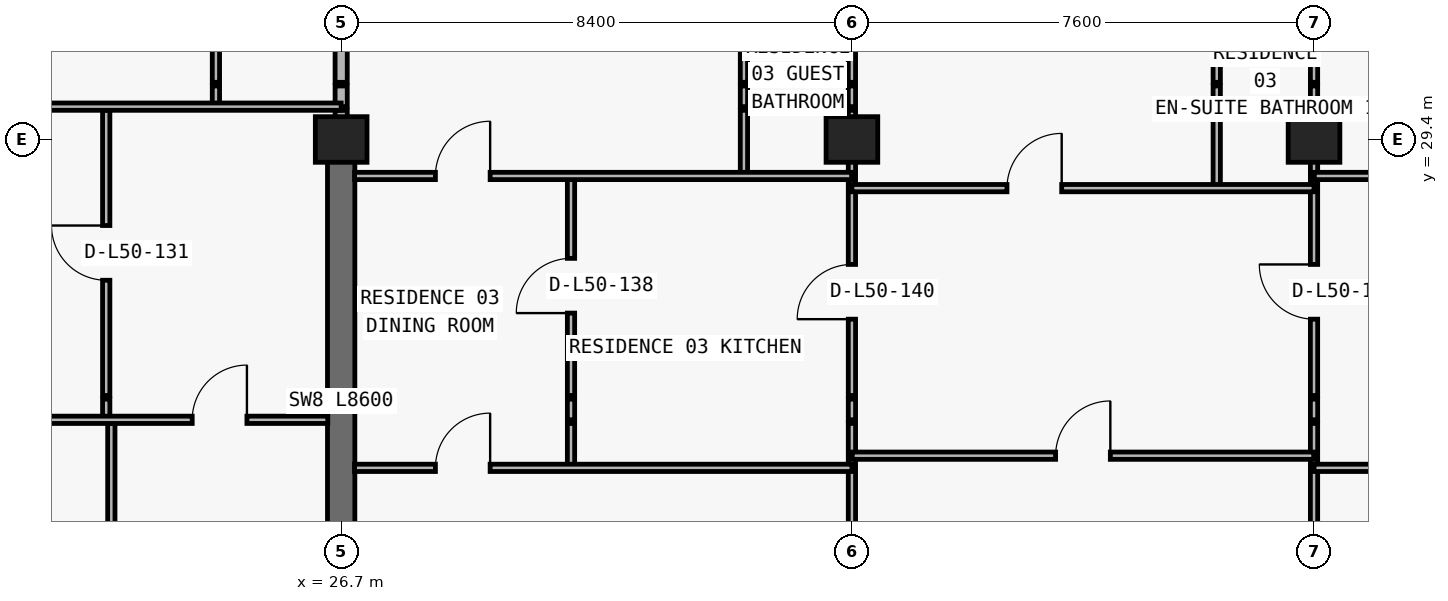
"""IFC4 building model, lengths in metres.
Left out: names, types, materials, properties, quantities, classifications, styles, units other than length and angle.
Written with IfcOpenShell. Run it as: python <this file> out.ifc"""

import sys

from ifc_helpers import new_model, si_unit, direction, frame, frame_2d, origin, origin_2d, place, context, subcontext, project, spatial, rectangle, extrude, element, fill, save


model = new_model("IFC4")
c1 = context("Model", 3, precision=1e-05, world=origin(), true_north=direction((0.0, 1.0)))
c2 = subcontext(c1, "Body", "Model", "MODEL_VIEW")
j1 = project(units=[si_unit("LENGTHUNIT", "METRE"), si_unit("PLANEANGLEUNIT", "RADIAN")], contexts=[c1])
p1 = place(None, origin())
s1 = spatial("IfcSite", under=j1, at=p1, CompositionType="ELEMENT")
p2 = place(p1, origin())
s2 = spatial("IfcBuilding", under=s1, at=p2, CompositionType="ELEMENT")
p3 = place(p2, frame((0.0, 0.0, 180.3)))
s3 = spatial("IfcBuildingStorey", under=s2, at=p3, CompositionType="ELEMENT", Elevation=180.3)
for number, where, z_axis, x_axis in (
    (1, (26.7, 29.4, 0.0), (0.0, 0.0, 1.0), (1.0, 0.0, 0.0)),
    (2, (35.1, 29.4, 0.0), (0.0, 0.0, 1.0), (1.0, 0.0, 0.0)),
    (3, (42.7, 29.4, 0.0), (0.0, 0.0, 1.0), (1.0, 0.0, 0.0)),
):
    element("IfcColumn", number, at=place(p3, frame(where, z_axis=z_axis, x_axis=x_axis)), inside=s3, PredefinedType="COLUMN", context=c2, shape_type="SweptSolid", body=[
        extrude(rectangle(XDim=0.85, YDim=0.75, at=origin_2d()), origin(), (0.0, 0.0, 1.0), 3.0),
    ])
p4 = place(p3, frame((26.7, 20.8, 0.0), z_axis=(0.0, 0.0, 1.0), x_axis=(0.0, 1.0, 0.0)))
e4 = element("IfcWall", 4, at=p4, inside=s3, PredefinedType="SHEAR", context=c2, shape_type="SweptSolid", body=[
    extrude(rectangle(XDim=8.6, YDim=0.45, at=frame_2d((4.3, 0.0))), origin(), (0.0, 0.0, 1.0), 3.0),
])
p5 = place(p3, frame((22.836, 24.79, 0.0), z_axis=(0.0, 0.0, 1.0), x_axis=(0.0, 1.0, 0.0)))
e5 = element("IfcWall", 5, at=p5, inside=s3, PredefinedType="PARTITIONING", context=c2, shape_type="SweptSolid", body=[
    extrude(rectangle(XDim=0.34, YDim=0.12, at=frame_2d((0.17, 0.0))), origin(), (0.0, 0.0, 1.0), 3.0),
])
p6 = place(p3, frame((22.836, 25.19, 0.0), z_axis=(0.0, 0.0, 1.0), x_axis=(0.0, 1.0, 0.0)))
e6 = element("IfcWall", 6, at=p6, inside=s3, PredefinedType="PARTITIONING", context=c2, shape_type="SweptSolid", body=[
    extrude(rectangle(XDim=4.69, YDim=0.12, at=frame_2d((2.345, 0.0))), origin(), (0.0, 0.0, 1.0), 3.0),
])
p7 = place(p6, frame((1.895, 0.0, 0.0)))
e7 = element("IfcOpeningElement", 7, at=p7, cuts=e6, PredefinedType="OPENING", context=c2, shape_type="SweptSolid", body=[
    extrude(rectangle(XDim=0.9, YDim=2.15, at=frame_2d((0.45, 1.075))), frame((0.0, 0.07, 0.0), z_axis=(0.0, -1.0, 0.0), x_axis=(1.0, 0.0, 0.0)), (0.0, 0.0, 1.0), 0.14),
])
p8 = place(p3, frame((22.92, 11.24, 0.0), z_axis=(0.0, 0.0, 1.0), x_axis=(0.0, 1.0, 0.0)))
e8 = element("IfcWall", 8, at=p8, inside=s3, PredefinedType="PARTITIONING", context=c2, shape_type="SweptSolid", body=[
    extrude(rectangle(XDim=13.49, YDim=0.12, at=frame_2d((6.745, 0.0))), origin(), (0.0, 0.0, 1.0), 3.0),
])
p9 = place(p3, frame((24.64, 29.94, 0.0), z_axis=(0.0, 0.0, 1.0), x_axis=(0.0, 1.0, 0.0)))
e9 = element("IfcWall", 9, at=p9, inside=s3, PredefinedType="PARTITIONING", context=c2, shape_type="SweptSolid", body=[
    extrude(rectangle(XDim=0.34, YDim=0.12, at=frame_2d((0.17, 0.0))), origin(), (0.0, 0.0, 1.0), 3.0),
])
p10 = place(p3, frame((24.64, 30.34, 0.0), z_axis=(0.0, 0.0, 1.0), x_axis=(0.0, 1.0, 0.0)))
e10 = element("IfcWall", 10, at=p10, inside=s3, PredefinedType="PARTITIONING", context=c2, shape_type="SweptSolid", body=[
    extrude(rectangle(XDim=4.26, YDim=0.12, at=frame_2d((2.13, 0.0))), origin(), (0.0, 0.0, 1.0), 3.0),
])
p11 = place(p10, frame((1.705, 0.0, 0.0)))
e11 = element("IfcOpeningElement", 11, at=p11, cuts=e10, PredefinedType="OPENING", context=c2, shape_type="SweptSolid", body=[
    extrude(rectangle(XDim=0.85, YDim=2.1, at=frame_2d((0.425, 1.05))), frame((0.0, 0.07, 0.0), z_axis=(0.0, -1.0, 0.0), x_axis=(1.0, 0.0, 0.0)), (0.0, 0.0, 1.0), 0.14),
])
p12 = place(p3, frame((26.7, 29.405, 0.0), z_axis=(0.0, 0.0, 1.0), x_axis=(0.0, 1.0, 0.0)))
e12 = element("IfcWall", 12, at=p12, inside=s3, PredefinedType="PARTITIONING", context=c2, shape_type="SweptSolid", body=[
    extrude(rectangle(XDim=0.475, YDim=0.2, at=frame_2d((0.237, 0.0))), origin(), (0.0, 0.0, 1.0), 2.285),
])
p13 = place(p3, frame((26.7, 29.94, 0.0), z_axis=(0.0, 0.0, 1.0), x_axis=(0.0, 1.0, 0.0)))
e13 = element("IfcWall", 13, at=p13, inside=s3, PredefinedType="PARTITIONING", context=c2, shape_type="SweptSolid", body=[
    extrude(rectangle(XDim=0.34, YDim=0.2, at=frame_2d((0.17, 0.0))), origin(), (0.0, 0.0, 1.0), 2.285),
])
p14 = place(p3, frame((26.7, 30.34, 0.0), z_axis=(0.0, 0.0, 1.0), x_axis=(0.0, 1.0, 0.0)))
e14 = element("IfcWall", 14, at=p14, inside=s3, PredefinedType="PARTITIONING", context=c2, shape_type="SweptSolid", body=[
    extrude(rectangle(XDim=4.26, YDim=0.2, at=frame_2d((2.13, 0.0))), origin(), (0.0, 0.0, 1.0), 2.285),
])
p15 = place(p3, frame((30.48, 24.0, 0.0), z_axis=(0.0, 0.0, 1.0), x_axis=(0.0, 1.0, 0.0)))
e15 = element("IfcWall", 15, at=p15, inside=s3, PredefinedType="PARTITIONING", context=c2, shape_type="SweptSolid", body=[
    extrude(rectangle(XDim=0.73, YDim=0.12, at=frame_2d((0.365, 0.0))), origin(), (0.0, 0.0, 1.0), 3.0),
])
p16 = place(p3, frame((30.48, 24.79, 0.0), z_axis=(0.0, 0.0, 1.0), x_axis=(0.0, 1.0, 0.0)))
e16 = element("IfcWall", 16, at=p16, inside=s3, PredefinedType="PARTITIONING", context=c2, shape_type="SweptSolid", body=[
    extrude(rectangle(XDim=0.34, YDim=0.12, at=frame_2d((0.17, 0.0))), origin(), (0.0, 0.0, 1.0), 3.0),
])
p17 = place(p3, frame((30.48, 25.19, 0.0), z_axis=(0.0, 0.0, 1.0), x_axis=(0.0, 1.0, 0.0)))
e17 = element("IfcWall", 17, at=p17, inside=s3, PredefinedType="PARTITIONING", context=c2, shape_type="SweptSolid", body=[
    extrude(rectangle(XDim=3.61, YDim=0.12, at=frame_2d((1.805, 0.0))), origin(), (0.0, 0.0, 1.0), 3.0),
])
p18 = place(p17, frame((1.355, 0.0, 0.0)))
e18 = element("IfcOpeningElement", 18, at=p18, cuts=e17, PredefinedType="OPENING", context=c2, shape_type="SweptSolid", body=[
    extrude(rectangle(XDim=0.9, YDim=2.15, at=frame_2d((0.45, 1.075))), frame((0.0, 0.07, 0.0), z_axis=(0.0, -1.0, 0.0), x_axis=(1.0, 0.0, 0.0)), (0.0, 0.0, 1.0), 0.14),
])
p19 = place(p3, frame((33.324, 28.8, 0.0), z_axis=(0.0, 0.0, 1.0), x_axis=(0.0, 1.0, 0.0)))
e19 = element("IfcWall", 19, at=p19, inside=s3, PredefinedType="PARTITIONING", context=c2, shape_type="SweptSolid", body=[
    extrude(rectangle(XDim=1.08, YDim=0.12, at=frame_2d((0.54, 0.0))), origin(), (0.0, 0.0, 1.0), 3.0),
])
p20 = place(p3, frame((33.324, 29.94, 0.0), z_axis=(0.0, 0.0, 1.0), x_axis=(0.0, 1.0, 0.0)))
e20 = element("IfcWall", 20, at=p20, inside=s3, PredefinedType="PARTITIONING", context=c2, shape_type="SweptSolid", body=[
    extrude(rectangle(XDim=0.34, YDim=0.12, at=frame_2d((0.17, 0.0))), origin(), (0.0, 0.0, 1.0), 3.0),
])
p21 = place(p3, frame((33.324, 30.34, 0.0), z_axis=(0.0, 0.0, 1.0), x_axis=(0.0, 1.0, 0.0)))
e21 = element("IfcWall", 21, at=p21, inside=s3, PredefinedType="PARTITIONING", context=c2, shape_type="SweptSolid", body=[
    extrude(rectangle(XDim=4.26, YDim=0.12, at=frame_2d((2.13, 0.0))), origin(), (0.0, 0.0, 1.0), 3.0),
])
p22 = place(p21, frame((1.705, 0.0, 0.0)))
e22 = element("IfcOpeningElement", 22, at=p22, cuts=e21, PredefinedType="OPENING", context=c2, shape_type="SweptSolid", body=[
    extrude(rectangle(XDim=0.85, YDim=2.1, at=frame_2d((0.425, 1.05))), frame((0.0, 0.07, 0.0), z_axis=(0.0, -1.0, 0.0), x_axis=(1.0, 0.0, 0.0)), (0.0, 0.0, 1.0), 0.14),
])
p23 = place(p3, frame((35.1, 11.24, 0.0), z_axis=(0.0, 0.0, 1.0), x_axis=(0.0, 1.0, 0.0)))
e23 = element("IfcWall", 23, at=p23, inside=s3, PredefinedType="PARTITIONING", context=c2, shape_type="SweptSolid", body=[
    extrude(rectangle(XDim=13.49, YDim=0.12, at=frame_2d((6.745, 0.0))), origin(), (0.0, 0.0, 1.0), 2.213),
])
p24 = place(p3, frame((35.1, 24.79, 0.0), z_axis=(0.0, 0.0, 1.0), x_axis=(0.0, 1.0, 0.0)))
e24 = element("IfcWall", 24, at=p24, inside=s3, PredefinedType="PARTITIONING", context=c2, shape_type="SweptSolid", body=[
    extrude(rectangle(XDim=0.34, YDim=0.12, at=frame_2d((0.17, 0.0))), origin(), (0.0, 0.0, 1.0), 2.213),
])
p25 = place(p3, frame((35.1, 25.19, 0.0), z_axis=(0.0, 0.0, 1.0), x_axis=(0.0, 1.0, 0.0)))
e25 = element("IfcWall", 25, at=p25, inside=s3, PredefinedType="PARTITIONING", context=c2, shape_type="SweptSolid", body=[
    extrude(rectangle(XDim=4.69, YDim=0.12, at=frame_2d((2.345, 0.0))), origin(), (0.0, 0.0, 1.0), 2.213),
])
p26 = place(p25, frame((1.255, 0.0, 0.0)))
e26 = element("IfcOpeningElement", 26, at=p26, cuts=e25, PredefinedType="OPENING", context=c2, shape_type="SweptSolid", body=[
    extrude(rectangle(XDim=0.9, YDim=2.15, at=frame_2d((0.45, 1.075))), frame((0.0, 0.07, 0.0), z_axis=(0.0, -1.0, 0.0), x_axis=(1.0, 0.0, 0.0)), (0.0, 0.0, 1.0), 0.14),
])
p27 = place(p3, frame((35.1, 29.94, 0.0), z_axis=(0.0, 0.0, 1.0), x_axis=(0.0, 1.0, 0.0)))
e27 = element("IfcWall", 27, at=p27, inside=s3, PredefinedType="PARTITIONING", context=c2, shape_type="SweptSolid", body=[
    extrude(rectangle(XDim=0.34, YDim=0.12, at=frame_2d((0.17, 0.0))), origin(), (0.0, 0.0, 1.0), 2.213),
])
p28 = place(p3, frame((35.1, 30.34, 0.0), z_axis=(0.0, 0.0, 1.0), x_axis=(0.0, 1.0, 0.0)))
e28 = element("IfcWall", 28, at=p28, inside=s3, PredefinedType="PARTITIONING", context=c2, shape_type="SweptSolid", body=[
    extrude(rectangle(XDim=4.26, YDim=0.12, at=frame_2d((2.13, 0.0))), origin(), (0.0, 0.0, 1.0), 2.213),
])
p29 = place(p3, frame((41.1, 28.6, 0.0), z_axis=(0.0, 0.0, 1.0), x_axis=(0.0, 1.0, 0.0)))
e29 = element("IfcWall", 29, at=p29, inside=s3, PredefinedType="PARTITIONING", context=c2, shape_type="SweptSolid", body=[
    extrude(rectangle(XDim=1.28, YDim=0.12, at=frame_2d((0.64, 0.0))), origin(), (0.0, 0.0, 1.0), 3.0),
])
p30 = place(p3, frame((41.1, 29.94, 0.0), z_axis=(0.0, 0.0, 1.0), x_axis=(0.0, 1.0, 0.0)))
e30 = element("IfcWall", 30, at=p30, inside=s3, PredefinedType="PARTITIONING", context=c2, shape_type="SweptSolid", body=[
    extrude(rectangle(XDim=0.34, YDim=0.12, at=frame_2d((0.17, 0.0))), origin(), (0.0, 0.0, 1.0), 3.0),
])
p31 = place(p3, frame((41.1, 30.34, 0.0), z_axis=(0.0, 0.0, 1.0), x_axis=(0.0, 1.0, 0.0)))
e31 = element("IfcWall", 31, at=p31, inside=s3, PredefinedType="PARTITIONING", context=c2, shape_type="SweptSolid", body=[
    extrude(rectangle(XDim=4.26, YDim=0.12, at=frame_2d((2.13, 0.0))), origin(), (0.0, 0.0, 1.0), 3.0),
])
p32 = place(p31, frame((1.705, 0.0, 0.0)))
e32 = element("IfcOpeningElement", 32, at=p32, cuts=e31, PredefinedType="OPENING", context=c2, shape_type="SweptSolid", body=[
    extrude(rectangle(XDim=0.85, YDim=2.1, at=frame_2d((0.425, 1.05))), frame((0.0, 0.07, 0.0), z_axis=(0.0, -1.0, 0.0), x_axis=(1.0, 0.0, 0.0)), (0.0, 0.0, 1.0), 0.14),
])
p33 = place(p3, frame((42.7, 11.24, 0.0), z_axis=(0.0, 0.0, 1.0), x_axis=(0.0, 1.0, 0.0)))
e33 = element("IfcWall", 33, at=p33, inside=s3, PredefinedType="PARTITIONING", context=c2, shape_type="SweptSolid", body=[
    extrude(rectangle(XDim=13.49, YDim=0.12, at=frame_2d((6.745, 0.0))), origin(), (0.0, 0.0, 1.0), 2.213),
])
p34 = place(p3, frame((42.7, 24.79, 0.0), z_axis=(0.0, 0.0, 1.0), x_axis=(0.0, 1.0, 0.0)))
e34 = element("IfcWall", 34, at=p34, inside=s3, PredefinedType="PARTITIONING", context=c2, shape_type="SweptSolid", body=[
    extrude(rectangle(XDim=0.34, YDim=0.12, at=frame_2d((0.17, 0.0))), origin(), (0.0, 0.0, 1.0), 2.213),
])
p35 = place(p3, frame((42.7, 25.19, 0.0), z_axis=(0.0, 0.0, 1.0), x_axis=(0.0, 1.0, 0.0)))
e35 = element("IfcWall", 35, at=p35, inside=s3, PredefinedType="PARTITIONING", context=c2, shape_type="SweptSolid", body=[
    extrude(rectangle(XDim=4.69, YDim=0.12, at=frame_2d((2.345, 0.0))), origin(), (0.0, 0.0, 1.0), 2.213),
])
p36 = place(p35, frame((1.255, 0.0, 0.0)))
e36 = element("IfcOpeningElement", 36, at=p36, cuts=e35, PredefinedType="OPENING", context=c2, shape_type="SweptSolid", body=[
    extrude(rectangle(XDim=0.9, YDim=2.15, at=frame_2d((0.45, 1.075))), frame((0.0, 0.07, 0.0), z_axis=(0.0, -1.0, 0.0), x_axis=(1.0, 0.0, 0.0)), (0.0, 0.0, 1.0), 0.14),
])
p37 = place(p3, frame((42.7, 29.94, 0.0), z_axis=(0.0, 0.0, 1.0), x_axis=(0.0, 1.0, 0.0)))
e37 = element("IfcWall", 37, at=p37, inside=s3, PredefinedType="PARTITIONING", context=c2, shape_type="SweptSolid", body=[
    extrude(rectangle(XDim=0.34, YDim=0.12, at=frame_2d((0.17, 0.0))), origin(), (0.0, 0.0, 1.0), 2.213),
])
p38 = place(p3, frame((42.7, 30.34, 0.0), z_axis=(0.0, 0.0, 1.0), x_axis=(0.0, 1.0, 0.0)))
e38 = element("IfcWall", 38, at=p38, inside=s3, PredefinedType="PARTITIONING", context=c2, shape_type="SweptSolid", body=[
    extrude(rectangle(XDim=4.26, YDim=0.12, at=frame_2d((2.13, 0.0))), origin(), (0.0, 0.0, 1.0), 2.213),
])
p39 = place(p3, frame((26.92, 24.0, 0.0), z_axis=(0.0, 0.0, 1.0), x_axis=(1.0, 0.0, 0.0)))
e39 = element("IfcWall", 39, at=p39, inside=s3, PredefinedType="PARTITIONING", context=c2, shape_type="SweptSolid", body=[
    extrude(rectangle(XDim=8.18, YDim=0.12, at=frame_2d((4.09, 0.0))), origin(), (0.0, 0.0, 1.0), 3.0),
])
p40 = place(p39, frame((1.33, 0.0, 0.0)))
e40 = element("IfcOpeningElement", 40, at=p40, cuts=e39, PredefinedType="OPENING", context=c2, shape_type="SweptSolid", body=[
    extrude(rectangle(XDim=0.9, YDim=2.15, at=frame_2d((0.45, 1.075))), frame((0.0, 0.07, 0.0), z_axis=(0.0, -1.0, 0.0), x_axis=(1.0, 0.0, 0.0)), (0.0, 0.0, 1.0), 0.14),
])
p41 = place(p3, frame((42.7, 24.0, 0.0), z_axis=(0.0, 0.0, 1.0), x_axis=(1.0, 0.0, 0.0)))
e41 = element("IfcWall", 41, at=p41, inside=s3, PredefinedType="PARTITIONING", context=c2, shape_type="SweptSolid", body=[
    extrude(rectangle(XDim=8.18, YDim=0.12, at=frame_2d((4.09, 0.0))), origin(), (0.0, 0.0, 1.0), 3.0),
])
p42 = place(p41, frame((3.64, 0.0, 0.0)))
e42 = element("IfcOpeningElement", 42, at=p42, cuts=e41, PredefinedType="OPENING", context=c2, shape_type="SweptSolid", body=[
    extrude(rectangle(XDim=0.9, YDim=2.15, at=frame_2d((0.45, 1.075))), frame((0.0, 0.07, 0.0), z_axis=(0.0, -1.0, 0.0), x_axis=(1.0, 0.0, 0.0)), (0.0, 0.0, 1.0), 0.14),
])
p43 = place(p3, frame((35.105, 24.2, 0.0), z_axis=(0.0, 0.0, 1.0), x_axis=(1.0, 0.0, 0.0)))
e43 = element("IfcWall", 43, at=p43, inside=s3, PredefinedType="PARTITIONING", context=c2, shape_type="SweptSolid", body=[
    extrude(rectangle(XDim=7.59, YDim=0.12, at=frame_2d((3.795, 0.0))), origin(), (0.0, 0.0, 1.0), 3.0),
])
p44 = place(p43, frame((3.345, 0.0, 0.0)))
e44 = element("IfcOpeningElement", 44, at=p44, cuts=e43, PredefinedType="OPENING", context=c2, shape_type="SweptSolid", body=[
    extrude(rectangle(XDim=0.9, YDim=2.15, at=frame_2d((0.45, 1.075))), frame((0.0, 0.07, 0.0), z_axis=(0.0, -1.0, 0.0), x_axis=(1.0, 0.0, 0.0)), (0.0, 0.0, 1.0), 0.14),
])
p45 = place(p3, frame((18.3, 24.79, 0.0), z_axis=(0.0, 0.0, 1.0), x_axis=(1.0, 0.0, 0.0)))
e45 = element("IfcWall", 45, at=p45, inside=s3, PredefinedType="PARTITIONING", context=c2, shape_type="SweptSolid", body=[
    extrude(rectangle(XDim=8.18, YDim=0.12, at=frame_2d((4.09, 0.0))), origin(), (0.0, 0.0, 1.0), 3.0),
])
p46 = place(p45, frame((1.818, 0.0, 0.0)))
e46 = element("IfcOpeningElement", 46, at=p46, cuts=e45, PredefinedType="OPENING", context=c2, shape_type="SweptSolid", body=[
    extrude(rectangle(XDim=0.9, YDim=2.15, at=frame_2d((0.45, 1.075))), frame((0.0, 0.07, 0.0), z_axis=(0.0, -1.0, 0.0), x_axis=(1.0, 0.0, 0.0)), (0.0, 0.0, 1.0), 0.14),
])
p47 = place(p45, frame((5.95, 0.0, 0.0)))
e47 = element("IfcOpeningElement", 47, at=p47, cuts=e45, PredefinedType="OPENING", context=c2, shape_type="SweptSolid", body=[
    extrude(rectangle(XDim=0.9, YDim=2.15, at=frame_2d((0.45, 1.075))), frame((0.0, 0.07, 0.0), z_axis=(0.0, -1.0, 0.0), x_axis=(1.0, 0.0, 0.0)), (0.0, 0.0, 1.0), 0.14),
])
p48 = place(p3, frame((35.1, 28.6, 0.0), z_axis=(0.0, 0.0, 1.0), x_axis=(1.0, 0.0, 0.0)))
e48 = element("IfcWall", 48, at=p48, inside=s3, PredefinedType="PARTITIONING", context=c2, shape_type="SweptSolid", body=[
    extrude(rectangle(XDim=7.6, YDim=0.12, at=frame_2d((3.8, 0.0))), origin(), (0.0, 0.0, 1.0), 3.0),
])
p49 = place(p48, frame((2.55, 0.0, 0.0)))
e49 = element("IfcOpeningElement", 49, at=p49, cuts=e48, PredefinedType="OPENING", context=c2, shape_type="SweptSolid", body=[
    extrude(rectangle(XDim=0.9, YDim=2.15, at=frame_2d((0.45, 1.075))), frame((0.0, 0.07, 0.0), z_axis=(0.0, -1.0, 0.0), x_axis=(1.0, 0.0, 0.0)), (0.0, 0.0, 1.0), 0.14),
])
p50 = place(p3, frame((26.92, 28.8, 0.0), z_axis=(0.0, 0.0, 1.0), x_axis=(1.0, 0.0, 0.0)))
e50 = element("IfcWall", 50, at=p50, inside=s3, PredefinedType="PARTITIONING", context=c2, shape_type="SweptSolid", body=[
    extrude(rectangle(XDim=8.175, YDim=0.12, at=frame_2d((4.087, 0.0))), origin(), (0.0, 0.0, 1.0), 3.0),
])
p51 = place(p50, frame((1.33, 0.0, 0.0)))
e51 = element("IfcOpeningElement", 51, at=p51, cuts=e50, PredefinedType="OPENING", context=c2, shape_type="SweptSolid", body=[
    extrude(rectangle(XDim=0.9, YDim=2.15, at=frame_2d((0.45, 1.075))), frame((0.0, 0.07, 0.0), z_axis=(0.0, -1.0, 0.0), x_axis=(1.0, 0.0, 0.0)), (0.0, 0.0, 1.0), 0.14),
])
p52 = place(p3, frame((42.705, 28.8, 0.0), z_axis=(0.0, 0.0, 1.0), x_axis=(1.0, 0.0, 0.0)))
e52 = element("IfcWall", 52, at=p52, inside=s3, PredefinedType="PARTITIONING", context=c2, shape_type="SweptSolid", body=[
    extrude(rectangle(XDim=8.175, YDim=0.12, at=frame_2d((4.087, 0.0))), origin(), (0.0, 0.0, 1.0), 3.0),
])
p53 = place(p52, frame((2.877, 0.0, 0.0)))
e53 = element("IfcOpeningElement", 53, at=p53, cuts=e52, PredefinedType="OPENING", context=c2, shape_type="SweptSolid", body=[
    extrude(rectangle(XDim=0.9, YDim=2.15, at=frame_2d((0.45, 1.075))), frame((0.0, 0.07, 0.0), z_axis=(0.0, -1.0, 0.0), x_axis=(1.0, 0.0, 0.0)), (0.0, 0.0, 1.0), 0.14),
])
p54 = place(p3, frame((18.3, 29.94, 0.0), z_axis=(0.0, 0.0, 1.0), x_axis=(1.0, 0.0, 0.0)))
e54 = element("IfcWall", 54, at=p54, inside=s3, PredefinedType="PARTITIONING", context=c2, shape_type="SweptSolid", body=[
    extrude(rectangle(XDim=8.4, YDim=0.12, at=frame_2d((4.2, 0.0))), origin(), (0.0, 0.0, 1.0), 3.0),
])
p55 = place(p54, frame((1.818, 0.0, 0.0)))
e55 = element("IfcOpeningElement", 55, at=p55, cuts=e54, PredefinedType="OPENING", context=c2, shape_type="SweptSolid", body=[
    extrude(rectangle(XDim=0.9, YDim=2.15, at=frame_2d((0.45, 1.075))), frame((0.0, 0.07, 0.0), z_axis=(0.0, -1.0, 0.0), x_axis=(1.0, 0.0, 0.0)), (0.0, 0.0, 1.0), 0.14),
])
p56 = place(p7, origin())
e56 = element("IfcDoor", 56, at=p56, inside=s3, OperationType="SINGLE_SWING_RIGHT", PredefinedType="DOOR", context=c2, shape_type="SweptSolid", body=[
    extrude(rectangle(XDim=0.9, YDim=2.15, at=frame_2d((0.45, 1.075))), frame((0.0, 0.025, 0.0), z_axis=(0.0, -1.0, 0.0), x_axis=(1.0, 0.0, 0.0)), (0.0, 0.0, 1.0), 0.05),
])
fill(e7, e56)
p57 = place(p47, origin())
e57 = element("IfcDoor", 57, at=p57, inside=s3, OperationType="SINGLE_SWING_RIGHT", PredefinedType="DOOR", context=c2, shape_type="SweptSolid", body=[
    extrude(rectangle(XDim=0.9, YDim=2.15, at=frame_2d((0.45, 1.075))), frame((0.0, 0.025, 0.0), z_axis=(0.0, -1.0, 0.0), x_axis=(1.0, 0.0, 0.0)), (0.0, 0.0, 1.0), 0.05),
])
fill(e47, e57)
p58 = place(p51, origin())
e58 = element("IfcDoor", 58, at=p58, inside=s3, OperationType="SINGLE_SWING_RIGHT", PredefinedType="DOOR", context=c2, shape_type="SweptSolid", body=[
    extrude(rectangle(XDim=0.9, YDim=2.15, at=frame_2d((0.45, 1.075))), frame((0.0, 0.025, 0.0), z_axis=(0.0, -1.0, 0.0), x_axis=(1.0, 0.0, 0.0)), (0.0, 0.0, 1.0), 0.05),
])
fill(e51, e58)
p59 = place(p18, origin())
e59 = element("IfcDoor", 59, at=p59, inside=s3, OperationType="SINGLE_SWING_LEFT", PredefinedType="DOOR", context=c2, shape_type="SweptSolid", body=[
    extrude(rectangle(XDim=0.9, YDim=2.15, at=frame_2d((0.45, 1.075))), frame((0.0, 0.025, 0.0), z_axis=(0.0, -1.0, 0.0), x_axis=(1.0, 0.0, 0.0)), (0.0, 0.0, 1.0), 0.05),
])
fill(e18, e59)
p60 = place(p40, origin())
e60 = element("IfcDoor", 60, at=p60, inside=s3, OperationType="SINGLE_SWING_RIGHT", PredefinedType="DOOR", context=c2, shape_type="SweptSolid", body=[
    extrude(rectangle(XDim=0.9, YDim=2.15, at=frame_2d((0.45, 1.075))), frame((0.0, 0.025, 0.0), z_axis=(0.0, -1.0, 0.0), x_axis=(1.0, 0.0, 0.0)), (0.0, 0.0, 1.0), 0.05),
])
fill(e40, e60)
p61 = place(p26, origin())
e61 = element("IfcDoor", 61, at=p61, inside=s3, OperationType="SINGLE_SWING_LEFT", PredefinedType="DOOR", context=c2, shape_type="SweptSolid", body=[
    extrude(rectangle(XDim=0.9, YDim=2.15, at=frame_2d((0.45, 1.075))), frame((0.0, 0.025, 0.0), z_axis=(0.0, -1.0, 0.0), x_axis=(1.0, 0.0, 0.0)), (0.0, 0.0, 1.0), 0.05),
])
fill(e26, e61)
p62 = place(p49, origin())
e62 = element("IfcDoor", 62, at=p62, inside=s3, OperationType="SINGLE_SWING_RIGHT", PredefinedType="DOOR", context=c2, shape_type="SweptSolid", body=[
    extrude(rectangle(XDim=0.9, YDim=2.15, at=frame_2d((0.45, 1.075))), frame((0.0, 0.025, 0.0), z_axis=(0.0, -1.0, 0.0), x_axis=(1.0, 0.0, 0.0)), (0.0, 0.0, 1.0), 0.05),
])
fill(e49, e62)
p63 = place(p44, origin())
e63 = element("IfcDoor", 63, at=p63, inside=s3, OperationType="SINGLE_SWING_RIGHT", PredefinedType="DOOR", context=c2, shape_type="SweptSolid", body=[
    extrude(rectangle(XDim=0.9, YDim=2.15, at=frame_2d((0.45, 1.075))), frame((0.0, 0.025, 0.0), z_axis=(0.0, -1.0, 0.0), x_axis=(1.0, 0.0, 0.0)), (0.0, 0.0, 1.0), 0.05),
])
fill(e44, e63)
p64 = place(p36, origin())
e64 = element("IfcDoor", 64, at=p64, inside=s3, OperationType="SINGLE_SWING_RIGHT", PredefinedType="DOOR", context=c2, shape_type="SweptSolid", body=[
    extrude(rectangle(XDim=0.9, YDim=2.15, at=frame_2d((0.45, 1.075))), frame((0.0, 0.025, 0.0), z_axis=(0.0, -1.0, 0.0), x_axis=(1.0, 0.0, 0.0)), (0.0, 0.0, 1.0), 0.05),
])
fill(e36, e64)
save(model, sys.argv[1])
